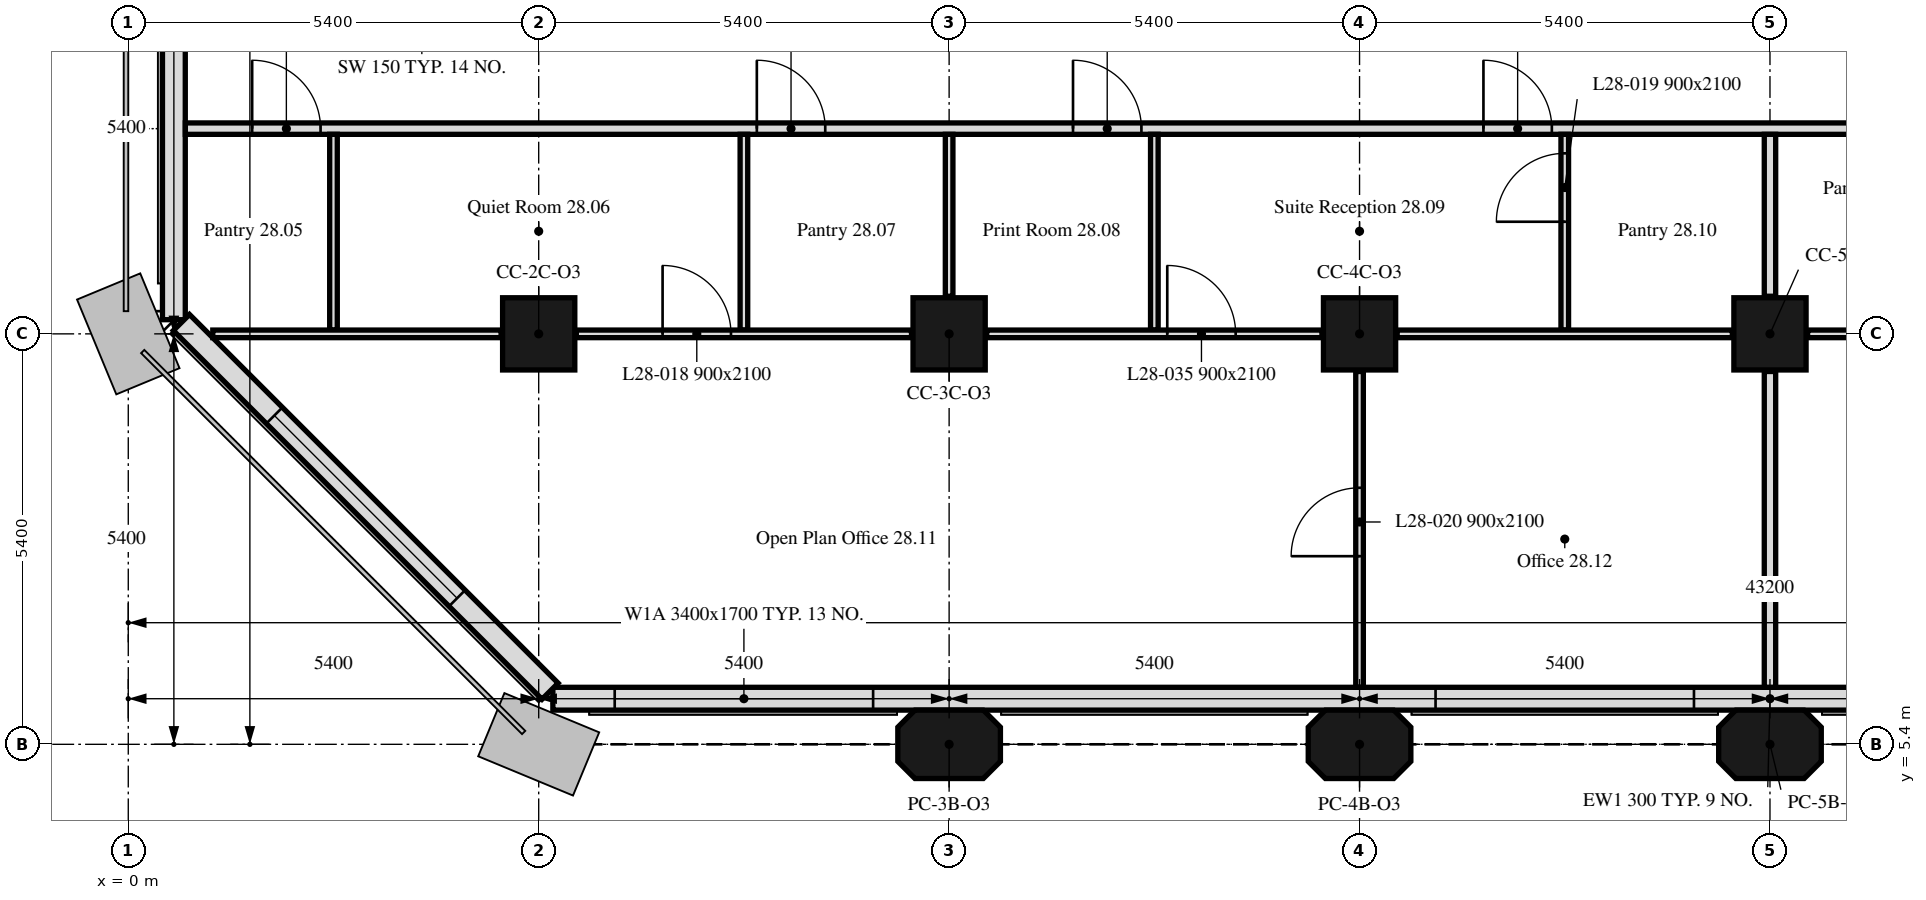
"""IFC4 building model, lengths in metres.
Left out: names, types, materials, properties, quantities, classifications, styles, units other than length and angle.
Written with IfcOpenShell. Run it as: python <this file> out.ifc"""

import sys

from ifc_helpers import new_model, si_unit, direction, frame, frame_2d, origin, origin_2d, place, context, subcontext, project, spatial, polyline, rectangle, outline, extrude, element, fill, save


model = new_model("IFC4")
c1 = context("Model", 3, precision=1e-05, world=origin(), true_north=direction((0.0, 1.0)))
c2 = subcontext(c1, "Body", "Model", "MODEL_VIEW")
j1 = project(units=[si_unit("LENGTHUNIT", "METRE"), si_unit("PLANEANGLEUNIT", "RADIAN")], contexts=[c1])
p1 = place(None, origin())
s1 = spatial("IfcSite", under=j1, at=p1, CompositionType="ELEMENT")
p2 = place(p1, origin())
s2 = spatial("IfcBuilding", under=s1, at=p2, CompositionType="ELEMENT")
p3 = place(p2, frame((0.0, 0.0, 118.2)))
s3 = spatial("IfcBuildingStorey", under=s2, at=p3, CompositionType="ELEMENT", Elevation=118.2)
for number, where, z_axis, x_axis in (
    (1, (10.8, 5.4, 0.0), (0.0, 0.0, 1.0), (1.0, 0.0, 0.0)),
    (2, (16.2, 5.4, 0.0), (0.0, 0.0, 1.0), (1.0, 0.0, 0.0)),
    (3, (21.6, 5.4, 0.0), (0.0, 0.0, 1.0), (1.0, 0.0, 0.0)),
):
    element("IfcColumn", number, at=place(p3, frame(where, z_axis=z_axis, x_axis=x_axis)), inside=s3, PredefinedType="COLUMN", context=c2, shape_type="SweptSolid", body=[
        extrude(outline(polyline([(-0.45, -0.45), (0.45, -0.45), (0.675, -0.225), (0.675, 0.225), (0.45, 0.45), (-0.45, 0.45), (-0.675, 0.225), (-0.675, -0.225), (-0.45, -0.45)])), origin(), (0.0, 0.0, 1.0), 3.5),
    ])
for number, where, z_axis, x_axis in (
    (4, (5.4, 10.8, 0.0), (0.0, 0.0, 1.0), (1.0, 0.0, 0.0)),
    (5, (10.8, 10.8, 0.0), (0.0, 0.0, 1.0), (1.0, 0.0, 0.0)),
    (6, (16.2, 10.8, 0.0), (0.0, 0.0, 1.0), (1.0, 0.0, 0.0)),
    (7, (21.6, 10.8, 0.0), (0.0, 0.0, 1.0), (1.0, 0.0, 0.0)),
):
    element("IfcColumn", number, at=place(p3, frame(where, z_axis=z_axis, x_axis=x_axis)), inside=s3, PredefinedType="COLUMN", context=c2, shape_type="SweptSolid", body=[
        extrude(rectangle(XDim=0.95, YDim=0.95, at=origin_2d()), origin(), (0.0, 0.0, 1.0), 3.5),
    ])
p4 = place(p3, frame((5.586, 6.0, 0.0), z_axis=(0.0, 0.0, 1.0), x_axis=(1.0, 0.0, 0.0)))
e8 = element("IfcWall", 8, at=p4, inside=s3, PredefinedType="SOLIDWALL", context=c2, shape_type="SweptSolid", body=[
    extrude(rectangle(XDim=32.027, YDim=0.3, at=frame_2d((16.014, 0.0))), origin(), (0.0, 0.0, 1.0), 3.5),
])
p5 = place(p4, frame((0.814, 0.0, 0.9)))
e9 = element("IfcOpeningElement", 9, at=p5, cuts=e8, PredefinedType="OPENING", context=c2, shape_type="SweptSolid", body=[
    extrude(rectangle(XDim=3.4, YDim=1.7, at=frame_2d((1.7, 0.85))), frame((0.0, 0.16, 0.0), z_axis=(0.0, -1.0, 0.0), x_axis=(1.0, 0.0, 0.0)), (0.0, 0.0, 1.0), 0.32),
])
p6 = place(p4, frame((11.614, 0.0, 0.9)))
e10 = element("IfcOpeningElement", 10, at=p6, cuts=e8, PredefinedType="OPENING", context=c2, shape_type="SweptSolid", body=[
    extrude(rectangle(XDim=3.4, YDim=1.7, at=frame_2d((1.7, 0.85))), frame((0.0, 0.16, 0.0), z_axis=(0.0, -1.0, 0.0), x_axis=(1.0, 0.0, 0.0)), (0.0, 0.0, 1.0), 0.32),
])
p7 = place(p4, frame((22.414, 0.0, 0.9)))
e11 = element("IfcOpeningElement", 11, at=p7, cuts=e8, PredefinedType="OPENING", context=c2, shape_type="SweptSolid", body=[
    extrude(rectangle(XDim=3.4, YDim=1.7, at=frame_2d((1.7, 0.85))), frame((0.0, 0.16, 0.0), z_axis=(0.0, -1.0, 0.0), x_axis=(1.0, 0.0, 0.0)), (0.0, 0.0, 1.0), 0.32),
])
p8 = place(p3, frame((0.6, 43.014, 0.0), z_axis=(0.0, 0.0, 1.0), x_axis=(0.0, -1.0, 0.0)))
e12 = element("IfcWall", 12, at=p8, inside=s3, PredefinedType="SOLIDWALL", context=c2, shape_type="SweptSolid", body=[
    extrude(rectangle(XDim=32.027, YDim=0.3, at=frame_2d((16.014, 0.0))), origin(), (0.0, 0.0, 1.0), 3.5),
])
p9 = place(p8, frame((0.814, 0.0, 0.9)))
e13 = element("IfcOpeningElement", 13, at=p9, cuts=e12, PredefinedType="OPENING", context=c2, shape_type="SweptSolid", body=[
    extrude(rectangle(XDim=3.4, YDim=1.7, at=frame_2d((1.7, 0.85))), frame((0.0, 0.16, 0.0), z_axis=(0.0, -1.0, 0.0), x_axis=(1.0, 0.0, 0.0)), (0.0, 0.0, 1.0), 0.32),
])
p10 = place(p8, frame((11.614, 0.0, 0.9)))
e14 = element("IfcOpeningElement", 14, at=p10, cuts=e12, PredefinedType="OPENING", context=c2, shape_type="SweptSolid", body=[
    extrude(rectangle(XDim=3.4, YDim=1.7, at=frame_2d((1.7, 0.85))), frame((0.0, 0.16, 0.0), z_axis=(0.0, -1.0, 0.0), x_axis=(1.0, 0.0, 0.0)), (0.0, 0.0, 1.0), 0.32),
])
p11 = place(p8, frame((22.414, 0.0, 0.9)))
e15 = element("IfcOpeningElement", 15, at=p11, cuts=e12, PredefinedType="OPENING", context=c2, shape_type="SweptSolid", body=[
    extrude(rectangle(XDim=3.4, YDim=1.7, at=frame_2d((1.7, 0.85))), frame((0.0, 0.16, 0.0), z_axis=(0.0, -1.0, 0.0), x_axis=(1.0, 0.0, 0.0)), (0.0, 0.0, 1.0), 0.32),
])
p12 = place(p3, frame((0.699, 10.949, 0.0), z_axis=(0.0, 0.0, 1.0), x_axis=(0.707106781187, -0.707106781187, 0.0)))
e16 = element("IfcWall", 16, at=p12, inside=s3, PredefinedType="SOLIDWALL", context=c2, shape_type="SweptSolid", body=[
    extrude(rectangle(XDim=6.86, YDim=0.3, at=frame_2d((3.43, 0.0))), origin(), (0.0, 0.0, 1.0), 3.5),
])
p13 = place(p12, frame((1.73, 0.0, 0.9)))
e17 = element("IfcOpeningElement", 17, at=p13, cuts=e16, PredefinedType="OPENING", context=c2, shape_type="SweptSolid", body=[
    extrude(rectangle(XDim=3.4, YDim=1.7, at=frame_2d((1.7, 0.85))), frame((0.0, 0.16, 0.0), z_axis=(0.0, -1.0, 0.0), x_axis=(1.0, 0.0, 0.0)), (0.0, 0.0, 1.0), 0.32),
])
p14 = place(p3, frame((0.751, 13.5, 0.0), z_axis=(0.0, 0.0, 1.0), x_axis=(1.0, 0.0, 0.0)))
e18 = element("IfcWall", 18, at=p14, inside=s3, PredefinedType="PARTITIONING", context=c2, shape_type="SweptSolid", body=[
    extrude(rectangle(XDim=41.698, YDim=0.15, at=frame_2d((20.849, 0.0))), origin(), (0.0, 0.0, 1.0), 3.5),
])
p15 = place(p14, frame((0.879, 0.0, 0.0)))
e19 = element("IfcOpeningElement", 19, at=p15, cuts=e18, PredefinedType="OPENING", context=c2, shape_type="SweptSolid", body=[
    extrude(rectangle(XDim=0.9, YDim=2.1, at=frame_2d((0.45, 1.05))), frame((0.0, 0.075, 0.0), z_axis=(0.0, -1.0, 0.0), x_axis=(1.0, 0.0, 0.0)), (0.0, 0.0, 1.0), 0.15),
])
p16 = place(p14, frame((7.519, 0.0, 0.0)))
e20 = element("IfcOpeningElement", 20, at=p16, cuts=e18, PredefinedType="OPENING", context=c2, shape_type="SweptSolid", body=[
    extrude(rectangle(XDim=0.9, YDim=2.1, at=frame_2d((0.45, 1.05))), frame((0.0, 0.075, 0.0), z_axis=(0.0, -1.0, 0.0), x_axis=(1.0, 0.0, 0.0)), (0.0, 0.0, 1.0), 0.15),
])
p17 = place(p14, frame((11.679, 0.0, 0.0)))
e21 = element("IfcOpeningElement", 21, at=p17, cuts=e18, PredefinedType="OPENING", context=c2, shape_type="SweptSolid", body=[
    extrude(rectangle(XDim=0.9, YDim=2.1, at=frame_2d((0.45, 1.05))), frame((0.0, 0.075, 0.0), z_axis=(0.0, -1.0, 0.0), x_axis=(1.0, 0.0, 0.0)), (0.0, 0.0, 1.0), 0.15),
])
p18 = place(p14, frame((22.479, 0.0, 0.0)))
e22 = element("IfcOpeningElement", 22, at=p18, cuts=e18, PredefinedType="OPENING", context=c2, shape_type="SweptSolid", body=[
    extrude(rectangle(XDim=0.9, YDim=2.1, at=frame_2d((0.45, 1.05))), frame((0.0, 0.075, 0.0), z_axis=(0.0, -1.0, 0.0), x_axis=(1.0, 0.0, 0.0)), (0.0, 0.0, 1.0), 0.15),
])
p19 = place(p14, frame((33.899, 0.0, 0.0)))
e23 = element("IfcOpeningElement", 23, at=p19, cuts=e18, PredefinedType="OPENING", context=c2, shape_type="SweptSolid", body=[
    extrude(rectangle(XDim=0.9, YDim=2.1, at=frame_2d((0.45, 1.05))), frame((0.0, 0.075, 0.0), z_axis=(0.0, -1.0, 0.0), x_axis=(1.0, 0.0, 0.0)), (0.0, 0.0, 1.0), 0.15),
])
p20 = place(p14, frame((17.079, 0.0, 0.0)))
e24 = element("IfcOpeningElement", 24, at=p20, cuts=e18, PredefinedType="OPENING", context=c2, shape_type="SweptSolid", body=[
    extrude(rectangle(XDim=0.9, YDim=2.1, at=frame_2d((0.45, 1.05))), frame((0.0, 0.075, 0.0), z_axis=(0.0, -1.0, 0.0), x_axis=(1.0, 0.0, 0.0)), (0.0, 0.0, 1.0), 0.15),
])
p21 = place(p14, frame((27.879, 0.0, 0.0)))
e25 = element("IfcOpeningElement", 25, at=p21, cuts=e18, PredefinedType="OPENING", context=c2, shape_type="SweptSolid", body=[
    extrude(rectangle(XDim=0.9, YDim=2.1, at=frame_2d((0.45, 1.05))), frame((0.0, 0.075, 0.0), z_axis=(0.0, -1.0, 0.0), x_axis=(1.0, 0.0, 0.0)), (0.0, 0.0, 1.0), 0.15),
])
p22 = place(p3, frame((2.7, 10.85, 0.0), z_axis=(0.0, 0.0, 1.0), x_axis=(0.0, 1.0, 0.0)))
e26 = element("IfcWall", 26, at=p22, inside=s3, PredefinedType="PARTITIONING", context=c2, shape_type="SweptSolid", body=[
    extrude(rectangle(XDim=2.575, YDim=0.1, at=frame_2d((1.288, 0.0))), origin(), (0.0, 0.0, 1.0), 3.5),
])
p23 = place(p3, frame((1.112, 10.8, 0.0), z_axis=(0.0, 0.0, 1.0), x_axis=(1.0, 0.0, 0.0)))
e27 = element("IfcWall", 27, at=p23, inside=s3, PredefinedType="PARTITIONING", context=c2, shape_type="SweptSolid", body=[
    extrude(rectangle(XDim=3.793, YDim=0.1, at=frame_2d((1.896, 0.0))), origin(), (0.0, 0.0, 1.0), 3.5),
])
p24 = place(p3, frame((8.1, 10.85, 0.0), z_axis=(0.0, 0.0, 1.0), x_axis=(0.0, 1.0, 0.0)))
e28 = element("IfcWall", 28, at=p24, inside=s3, PredefinedType="PARTITIONING", context=c2, shape_type="SweptSolid", body=[
    extrude(rectangle(XDim=2.575, YDim=0.1, at=frame_2d((1.288, 0.0))), origin(), (0.0, 0.0, 1.0), 3.5),
])
p25 = place(p3, frame((5.895, 10.8, 0.0), z_axis=(0.0, 0.0, 1.0), x_axis=(1.0, 0.0, 0.0)))
e29 = element("IfcWall", 29, at=p25, inside=s3, PredefinedType="PARTITIONING", context=c2, shape_type="SweptSolid", body=[
    extrude(rectangle(XDim=4.41, YDim=0.1, at=frame_2d((2.205, 0.0))), origin(), (0.0, 0.0, 1.0), 3.5),
])
p26 = place(p25, frame((1.135, 0.0, 0.0)))
e30 = element("IfcOpeningElement", 30, at=p26, cuts=e29, PredefinedType="OPENING", context=c2, shape_type="SweptSolid", body=[
    extrude(rectangle(XDim=0.9, YDim=2.1, at=frame_2d((0.45, 1.05))), frame((0.0, 0.05, 0.0), z_axis=(0.0, -1.0, 0.0), x_axis=(1.0, 0.0, 0.0)), (0.0, 0.0, 1.0), 0.1),
])
p27 = place(p3, frame((10.8, 11.295, 0.0), z_axis=(0.0, 0.0, 1.0), x_axis=(0.0, 1.0, 0.0)))
e31 = element("IfcWall", 31, at=p27, inside=s3, PredefinedType="PARTITIONING", context=c2, shape_type="SweptSolid", body=[
    extrude(rectangle(XDim=2.13, YDim=0.1, at=frame_2d((1.065, 0.0))), origin(), (0.0, 0.0, 1.0), 3.5),
])
p28 = place(p3, frame((13.5, 10.85, 0.0), z_axis=(0.0, 0.0, 1.0), x_axis=(0.0, 1.0, 0.0)))
e32 = element("IfcWall", 32, at=p28, inside=s3, PredefinedType="PARTITIONING", context=c2, shape_type="SweptSolid", body=[
    extrude(rectangle(XDim=2.575, YDim=0.1, at=frame_2d((1.288, 0.0))), origin(), (0.0, 0.0, 1.0), 3.5),
])
p29 = place(p3, frame((11.295, 10.8, 0.0), z_axis=(0.0, 0.0, 1.0), x_axis=(1.0, 0.0, 0.0)))
e33 = element("IfcWall", 33, at=p29, inside=s3, PredefinedType="PARTITIONING", context=c2, shape_type="SweptSolid", body=[
    extrude(rectangle(XDim=4.41, YDim=0.1, at=frame_2d((2.205, 0.0))), origin(), (0.0, 0.0, 1.0), 3.5),
])
p30 = place(p29, frame((2.375, 0.0, 0.0)))
e34 = element("IfcOpeningElement", 34, at=p30, cuts=e33, PredefinedType="OPENING", context=c2, shape_type="SweptSolid", body=[
    extrude(rectangle(XDim=0.9, YDim=2.1, at=frame_2d((0.45, 1.05))), frame((0.0, 0.05, 0.0), z_axis=(0.0, -1.0, 0.0), x_axis=(1.0, 0.0, 0.0)), (0.0, 0.0, 1.0), 0.1),
])
p31 = place(p3, frame((18.9, 10.85, 0.0), z_axis=(0.0, 0.0, 1.0), x_axis=(0.0, 1.0, 0.0)))
e35 = element("IfcWall", 35, at=p31, inside=s3, PredefinedType="PARTITIONING", context=c2, shape_type="SweptSolid", body=[
    extrude(rectangle(XDim=2.575, YDim=0.1, at=frame_2d((1.288, 0.0))), origin(), (0.0, 0.0, 1.0), 3.5),
])
p32 = place(p31, frame((1.425, 0.0, 0.0)))
e36 = element("IfcOpeningElement", 36, at=p32, cuts=e35, PredefinedType="OPENING", context=c2, shape_type="SweptSolid", body=[
    extrude(rectangle(XDim=0.9, YDim=2.1, at=frame_2d((0.45, 1.05))), frame((0.0, 0.05, 0.0), z_axis=(0.0, -1.0, 0.0), x_axis=(1.0, 0.0, 0.0)), (0.0, 0.0, 1.0), 0.1),
])
p33 = place(p3, frame((16.695, 10.8, 0.0), z_axis=(0.0, 0.0, 1.0), x_axis=(1.0, 0.0, 0.0)))
e37 = element("IfcWall", 37, at=p33, inside=s3, PredefinedType="PARTITIONING", context=c2, shape_type="SweptSolid", body=[
    extrude(rectangle(XDim=4.41, YDim=0.1, at=frame_2d((2.205, 0.0))), origin(), (0.0, 0.0, 1.0), 3.5),
])
p34 = place(p3, frame((21.6, 11.295, 0.0), z_axis=(0.0, 0.0, 1.0), x_axis=(0.0, 1.0, 0.0)))
e38 = element("IfcWall", 38, at=p34, inside=s3, PredefinedType="PARTITIONING", context=c2, shape_type="SweptSolid", body=[
    extrude(rectangle(XDim=2.13, YDim=0.15, at=frame_2d((1.065, 0.0))), origin(), (0.0, 0.0, 1.0), 3.5),
])
p35 = place(p3, frame((16.2, 6.151, 0.0), z_axis=(0.0, 0.0, 1.0), x_axis=(0.0, 1.0, 0.0)))
e39 = element("IfcWall", 39, at=p35, inside=s3, PredefinedType="PARTITIONING", context=c2, shape_type="SweptSolid", body=[
    extrude(rectangle(XDim=4.154, YDim=0.1, at=frame_2d((2.077, 0.0))), origin(), (0.0, 0.0, 1.0), 3.5),
])
p36 = place(p35, frame((1.724, 0.0, 0.0)))
e40 = element("IfcOpeningElement", 40, at=p36, cuts=e39, PredefinedType="OPENING", context=c2, shape_type="SweptSolid", body=[
    extrude(rectangle(XDim=0.9, YDim=2.1, at=frame_2d((0.45, 1.05))), frame((0.0, 0.05, 0.0), z_axis=(0.0, -1.0, 0.0), x_axis=(1.0, 0.0, 0.0)), (0.0, 0.0, 1.0), 0.1),
])
p37 = place(p3, frame((21.6, 6.151, 0.0), z_axis=(0.0, 0.0, 1.0), x_axis=(0.0, 1.0, 0.0)))
e41 = element("IfcWall", 41, at=p37, inside=s3, PredefinedType="PARTITIONING", context=c2, shape_type="SweptSolid", body=[
    extrude(rectangle(XDim=4.154, YDim=0.15, at=frame_2d((2.077, 0.0))), origin(), (0.0, 0.0, 1.0), 3.5),
])
p38 = place(p3, frame((22.095, 10.8, 0.0), z_axis=(0.0, 0.0, 1.0), x_axis=(1.0, 0.0, 0.0)))
e42 = element("IfcWall", 42, at=p38, inside=s3, PredefinedType="PARTITIONING", context=c2, shape_type="SweptSolid", body=[
    extrude(rectangle(XDim=4.41, YDim=0.1, at=frame_2d((2.205, 0.0))), origin(), (0.0, 0.0, 1.0), 3.5),
])
p39 = place(p38, frame((2.375, 0.0, 0.0)))
e43 = element("IfcOpeningElement", 43, at=p39, cuts=e42, PredefinedType="OPENING", context=c2, shape_type="SweptSolid", body=[
    extrude(rectangle(XDim=0.9, YDim=2.1, at=frame_2d((0.45, 1.05))), frame((0.0, 0.05, 0.0), z_axis=(0.0, -1.0, 0.0), x_axis=(1.0, 0.0, 0.0)), (0.0, 0.0, 1.0), 0.1),
])
p40 = place(p5, origin())
e44 = element("IfcWindow", 44, at=p40, inside=s3, PartitioningType="SINGLE_PANEL", PredefinedType="WINDOW", context=c2, shape_type="SweptSolid", body=[
    extrude(rectangle(XDim=3.4, YDim=1.7, at=frame_2d((1.7, 0.85))), frame((0.0, 0.03, 0.0), z_axis=(0.0, -1.0, 0.0), x_axis=(1.0, 0.0, 0.0)), (0.0, 0.0, 1.0), 0.06),
])
fill(e9, e44)
p41 = place(p6, origin())
e45 = element("IfcWindow", 45, at=p41, inside=s3, PartitioningType="SINGLE_PANEL", PredefinedType="WINDOW", context=c2, shape_type="SweptSolid", body=[
    extrude(rectangle(XDim=3.4, YDim=1.7, at=frame_2d((1.7, 0.85))), frame((0.0, 0.03, 0.0), z_axis=(0.0, -1.0, 0.0), x_axis=(1.0, 0.0, 0.0)), (0.0, 0.0, 1.0), 0.06),
])
fill(e10, e45)
p42 = place(p13, origin())
e46 = element("IfcWindow", 46, at=p42, inside=s3, PartitioningType="SINGLE_PANEL", PredefinedType="WINDOW", context=c2, shape_type="SweptSolid", body=[
    extrude(rectangle(XDim=3.4, YDim=1.7, at=frame_2d((1.7, 0.85))), frame((0.0, 0.03, 0.0), z_axis=(0.0, -1.0, 0.0), x_axis=(1.0, 0.0, 0.0)), (0.0, 0.0, 1.0), 0.06),
])
fill(e17, e46)
p43 = place(p15, origin())
e47 = element("IfcDoor", 47, at=p43, inside=s3, OperationType="SINGLE_SWING_LEFT", PredefinedType="DOOR", context=c2, shape_type="SweptSolid", body=[
    extrude(rectangle(XDim=0.9, YDim=2.1, at=frame_2d((0.45, 1.05))), frame((0.0, 0.025, 0.0), z_axis=(0.0, -1.0, 0.0), x_axis=(1.0, 0.0, 0.0)), (0.0, 0.0, 1.0), 0.05),
])
fill(e19, e47)
p44 = place(p16, origin())
e48 = element("IfcDoor", 48, at=p44, inside=s3, OperationType="SINGLE_SWING_LEFT", PredefinedType="DOOR", context=c2, shape_type="SweptSolid", body=[
    extrude(rectangle(XDim=0.9, YDim=2.1, at=frame_2d((0.45, 1.05))), frame((0.0, 0.025, 0.0), z_axis=(0.0, -1.0, 0.0), x_axis=(1.0, 0.0, 0.0)), (0.0, 0.0, 1.0), 0.05),
])
fill(e20, e48)
p45 = place(p17, origin())
e49 = element("IfcDoor", 49, at=p45, inside=s3, OperationType="SINGLE_SWING_LEFT", PredefinedType="DOOR", context=c2, shape_type="SweptSolid", body=[
    extrude(rectangle(XDim=0.9, YDim=2.1, at=frame_2d((0.45, 1.05))), frame((0.0, 0.025, 0.0), z_axis=(0.0, -1.0, 0.0), x_axis=(1.0, 0.0, 0.0)), (0.0, 0.0, 1.0), 0.05),
])
fill(e21, e49)
p46 = place(p26, origin())
e50 = element("IfcDoor", 50, at=p46, inside=s3, OperationType="SINGLE_SWING_LEFT", PredefinedType="DOOR", context=c2, shape_type="SweptSolid", body=[
    extrude(rectangle(XDim=0.9, YDim=2.1, at=frame_2d((0.45, 1.05))), frame((0.0, 0.025, 0.0), z_axis=(0.0, -1.0, 0.0), x_axis=(1.0, 0.0, 0.0)), (0.0, 0.0, 1.0), 0.05),
])
fill(e30, e50)
p47 = place(p32, origin())
e51 = element("IfcDoor", 51, at=p47, inside=s3, OperationType="SINGLE_SWING_LEFT", PredefinedType="DOOR", context=c2, shape_type="SweptSolid", body=[
    extrude(rectangle(XDim=0.9, YDim=2.1, at=frame_2d((0.45, 1.05))), frame((0.0, 0.025, 0.0), z_axis=(0.0, -1.0, 0.0), x_axis=(1.0, 0.0, 0.0)), (0.0, 0.0, 1.0), 0.05),
])
fill(e36, e51)
p48 = place(p36, origin())
e52 = element("IfcDoor", 52, at=p48, inside=s3, OperationType="SINGLE_SWING_RIGHT", PredefinedType="DOOR", context=c2, shape_type="SweptSolid", body=[
    extrude(rectangle(XDim=0.9, YDim=2.1, at=frame_2d((0.45, 1.05))), frame((0.0, 0.025, 0.0), z_axis=(0.0, -1.0, 0.0), x_axis=(1.0, 0.0, 0.0)), (0.0, 0.0, 1.0), 0.05),
])
fill(e40, e52)
p49 = place(p20, origin())
e53 = element("IfcDoor", 53, at=p49, inside=s3, OperationType="SINGLE_SWING_RIGHT", PredefinedType="DOOR", context=c2, shape_type="SweptSolid", body=[
    extrude(rectangle(XDim=0.9, YDim=2.1, at=frame_2d((0.45, 1.05))), frame((0.0, 0.025, 0.0), z_axis=(0.0, -1.0, 0.0), x_axis=(1.0, 0.0, 0.0)), (0.0, 0.0, 1.0), 0.05),
])
fill(e24, e53)
p50 = place(p30, origin())
e54 = element("IfcDoor", 54, at=p50, inside=s3, OperationType="SINGLE_SWING_LEFT", PredefinedType="DOOR", context=c2, shape_type="SweptSolid", body=[
    extrude(rectangle(XDim=0.9, YDim=2.1, at=frame_2d((0.45, 1.05))), frame((0.0, 0.025, 0.0), z_axis=(0.0, -1.0, 0.0), x_axis=(1.0, 0.0, 0.0)), (0.0, 0.0, 1.0), 0.05),
])
fill(e34, e54)
save(model, sys.argv[1])
